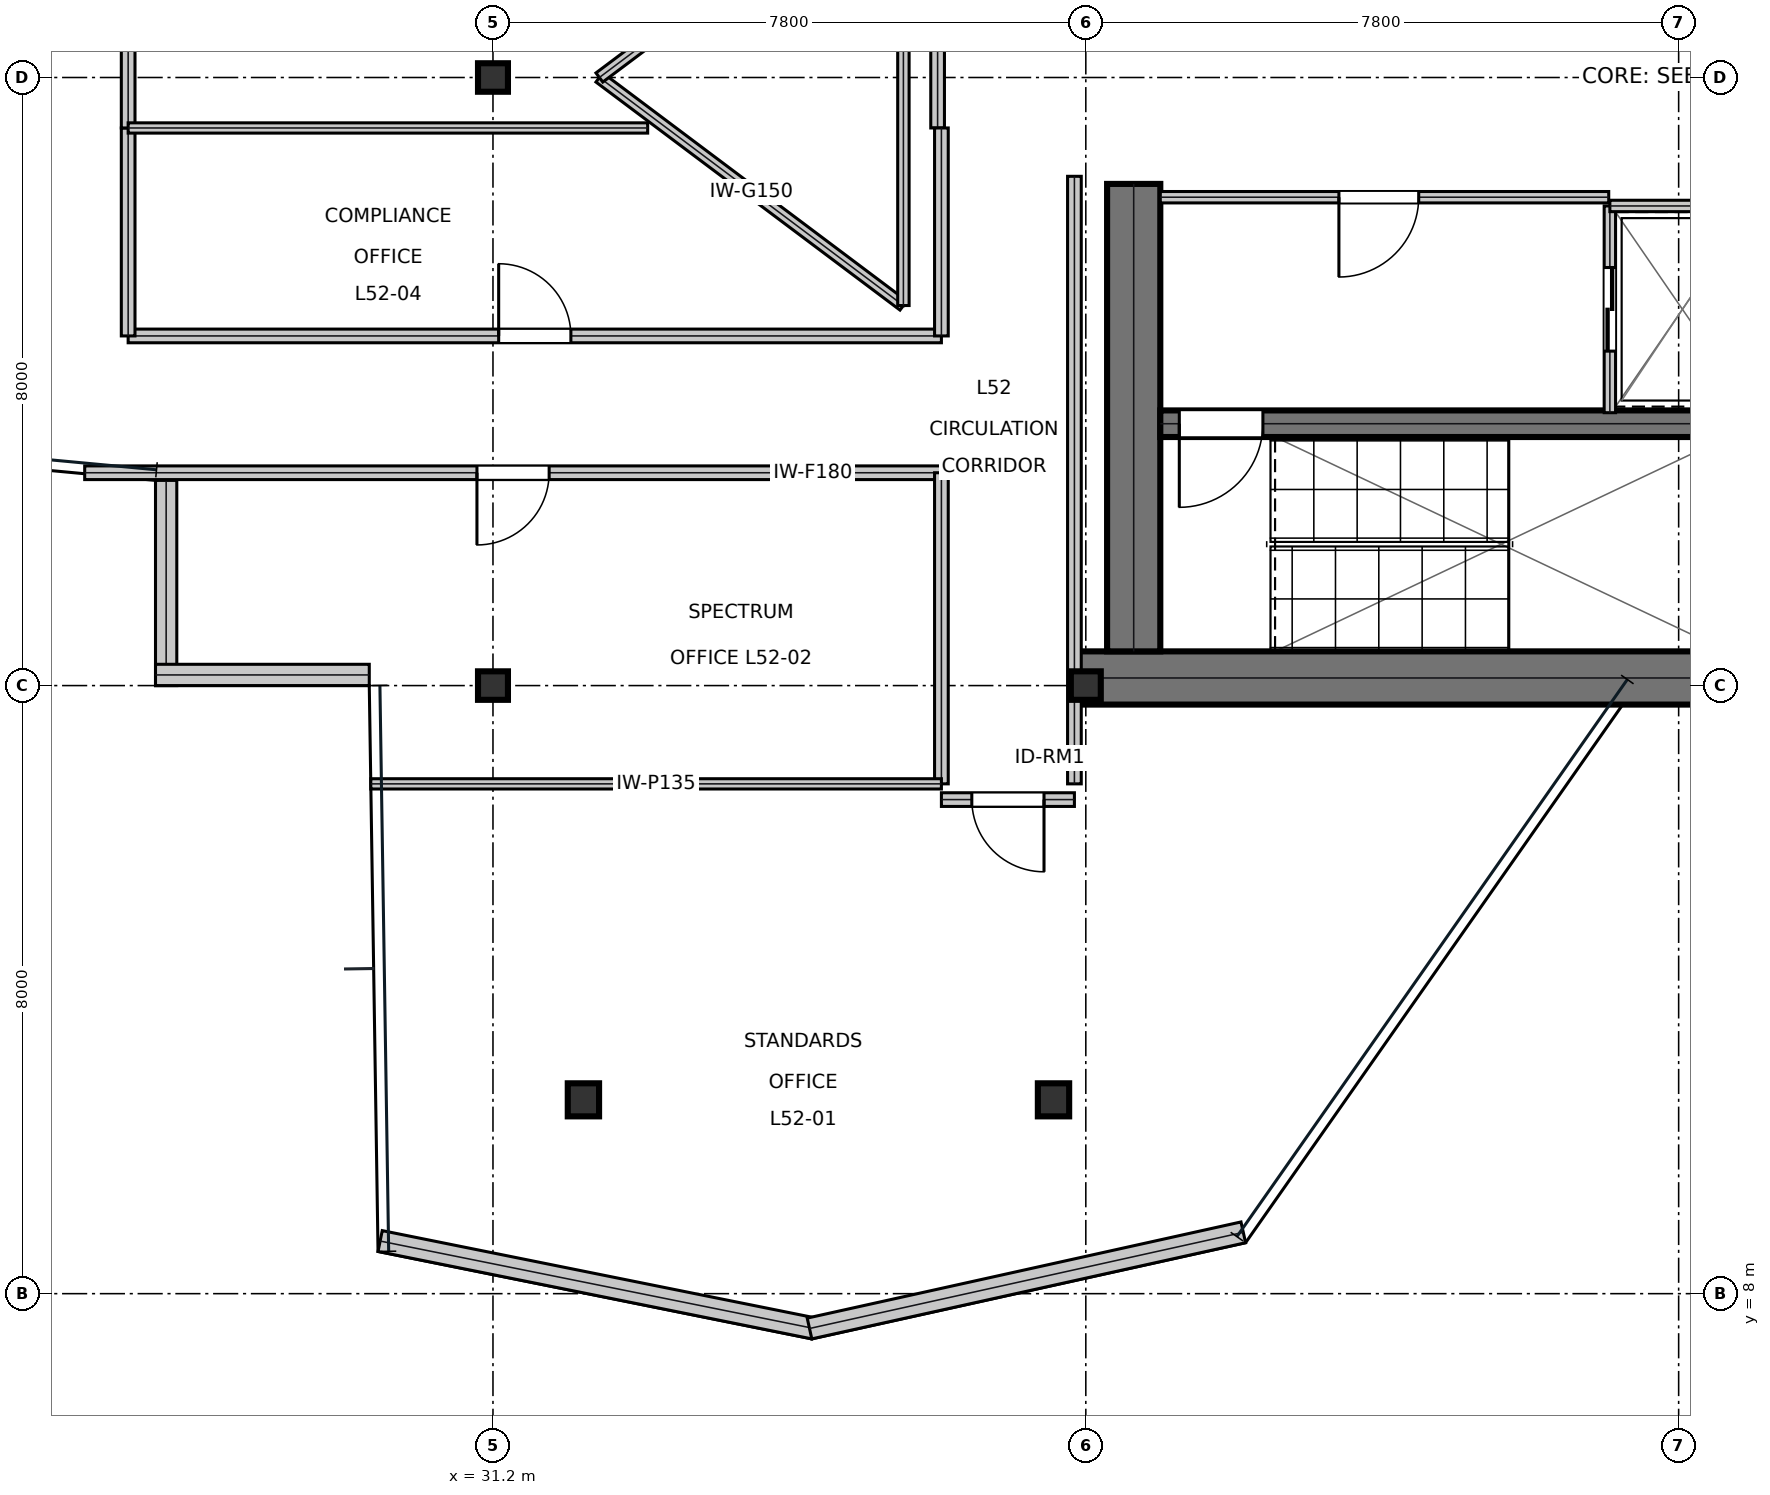
"""IFC4 building model, lengths in metres.
Left out: names, types, materials, properties, quantities, classifications, styles, units other than length and angle.
Written with IfcOpenShell. Run it as: python <this file> out.ifc"""

import sys

from ifc_helpers import new_model, si_unit, direction, frame, frame_2d, origin, origin_2d, place, context, subcontext, project, spatial, rectangle, i_section, extrude, element, fill, save


model = new_model("IFC4")
c1 = context("Model", 3, precision=1e-05, world=origin(), true_north=direction((0.0, 1.0)))
c2 = subcontext(c1, "Body", "Model", "MODEL_VIEW")
j1 = project(units=[si_unit("LENGTHUNIT", "METRE"), si_unit("PLANEANGLEUNIT", "RADIAN")], contexts=[c1])
p1 = place(None, origin())
s1 = spatial("IfcSite", under=j1, at=p1, CompositionType="ELEMENT")
p2 = place(p1, origin())
s2 = spatial("IfcBuilding", under=s1, at=p2, CompositionType="ELEMENT")
p3 = place(p2, frame((0.0, 0.0, 224.25)))
s3 = spatial("IfcBuildingStorey", under=s2, at=p3, CompositionType="ELEMENT", Elevation=224.25)
p4 = place(p3, frame((38.8, 16.1, 0.0), z_axis=(0.0, 0.0, 1.0), x_axis=(1.0, 0.0, 0.0)))
e1 = element("IfcWall", 1, at=p4, inside=s3, PredefinedType="SHEAR", context=c2, shape_type="SweptSolid", body=[
    extrude(rectangle(XDim=16.0, YDim=0.7, at=frame_2d((8.0, 0.0))), origin(), (0.0, 0.0, 1.0), 3.79),
])
p5 = place(p3, frame((39.63, 16.45, 0.0), z_axis=(0.0, 0.0, 1.0), x_axis=(0.0, 1.0, 0.0)))
e2 = element("IfcWall", 2, at=p5, inside=s3, PredefinedType="SHEAR", context=c2, shape_type="SweptSolid", body=[
    extrude(rectangle(XDim=6.15, YDim=0.7, at=frame_2d((3.075, 0.0))), origin(), (0.0, 0.0, 1.0), 3.79),
])
p6 = place(p3, frame((39.98, 19.445, 0.0), z_axis=(0.0, 0.0, 1.0), x_axis=(1.0, 0.0, 0.0)))
e3 = element("IfcWall", 3, at=p6, inside=s3, PredefinedType="SHEAR", context=c2, shape_type="SweptSolid", body=[
    extrude(rectangle(XDim=7.71, YDim=0.35, at=frame_2d((3.855, 0.0))), origin(), (0.0, 0.0, 1.0), 3.79),
])
p7 = place(p6, frame((0.25, 0.0, 0.0)))
e4 = element("IfcOpeningElement", 4, at=p7, cuts=e3, PredefinedType="OPENING", context=c2, shape_type="SweptSolid", body=[
    extrude(rectangle(XDim=1.1, YDim=2.15, at=frame_2d((0.55, 1.075))), frame((0.0, 0.185, 0.0), z_axis=(0.0, -1.0, 0.0), x_axis=(1.0, 0.0, 0.0)), (0.0, 0.0, 1.0), 0.37),
])
for number, where, z_axis, x_axis in (
    (5, (31.2, 16.0, 0.0), (0.0, 0.0, 1.0), (1.0, 0.0, 0.0)),
    (6, (31.2, 24.0, 0.0), (0.0, 0.0, 1.0), (1.0, 0.0, 0.0)),
    (7, (39.0, 16.0, 0.0), (0.0, 0.0, 1.0), (1.0, 0.0, 0.0)),
):
    element("IfcColumn", number, at=place(p3, frame(where, z_axis=z_axis, x_axis=x_axis)), inside=s3, PredefinedType="COLUMN", context=c2, shape_type="SweptSolid", body=[
        extrude(i_section(OverallWidth=0.394, OverallDepth=0.375, WebThickness=0.017, FlangeThickness=0.028, at=origin_2d()), origin(), (0.0, 0.0, 1.0), 4.044),
    ])
p8 = place(p3, frame((32.39, 10.55, 0.016), z_axis=(0.013968236766, 0.029819148922, 0.999457706318), x_axis=(-0.905569653976, 0.424197597586, 0.0)))
e8 = element("IfcColumn", 8, at=p8, inside=s3, PredefinedType="COLUMN", context=c2, shape_type="SweptSolid", body=[
    extrude(i_section(OverallWidth=0.412, OverallDepth=0.435, WebThickness=0.036, FlangeThickness=0.058, at=origin_2d()), origin(), (0.0, 0.0, 1.0), 4.02),
])
p9 = place(p3, frame((38.575, 10.55, 0.016), z_axis=(-0.004980404192, 0.029821688517, 0.99954282673), x_axis=(-0.986339577116, -0.164724735893, 0.0)))
e9 = element("IfcColumn", 9, at=p9, inside=s3, PredefinedType="COLUMN", context=c2, shape_type="SweptSolid", body=[
    extrude(i_section(OverallWidth=0.412, OverallDepth=0.435, WebThickness=0.036, FlangeThickness=0.058, at=origin_2d()), origin(), (0.0, 0.0, 1.0), 4.02),
])
p10 = place(p3, frame((26.9, 18.7, 0.0), z_axis=(0.0, 0.0, 1.0), x_axis=(0.0, -1.0, 0.0)))
e10 = element("IfcWall", 10, at=p10, inside=s3, PredefinedType="STANDARD", context=c2, shape_type="SweptSolid", body=[
    extrude(rectangle(XDim=2.7, YDim=0.28, at=frame_2d((1.35, 0.0))), origin(), (0.0, 0.0, 1.0), 3.319),
])
p11 = place(p3, frame((26.76, 16.14, 0.0), z_axis=(0.0, 0.0, 1.0), x_axis=(1.0, 0.0, 0.0)))
e11 = element("IfcWall", 11, at=p11, inside=s3, PredefinedType="STANDARD", context=c2, shape_type="SweptSolid", body=[
    extrude(rectangle(XDim=2.812, YDim=0.28, at=frame_2d((1.406, 0.0))), origin(), (0.0, 0.0, 1.0), 3.79),
])
p12 = place(p3, frame((29.715, 8.692, 0.0), z_axis=(0.0, 0.0, 1.0), x_axis=(0.98030065813, -0.197511062146, 0.0)))
e12 = element("IfcWall", 12, at=p12, inside=s3, PredefinedType="STANDARD", context=c2, shape_type="SweptSolid", body=[
    extrude(rectangle(XDim=5.822, YDim=0.28, at=frame_2d((2.911, 0.0))), origin(), (0.0, 0.0, 1.0), 3.79),
])
p13 = place(p3, frame((35.365, 7.542, 0.0), z_axis=(0.0, 0.0, 1.0), x_axis=(0.976309738065, 0.216377668346, 0.0)))
e13 = element("IfcWall", 13, at=p13, inside=s3, PredefinedType="STANDARD", context=c2, shape_type="SweptSolid", body=[
    extrude(rectangle(XDim=5.846, YDim=0.28, at=frame_2d((2.923, 0.0))), origin(), (0.0, 0.0, 1.0), 3.79),
])
p14 = place(p3, frame((39.98, 22.425, 0.0), z_axis=(0.0, 0.0, 1.0), x_axis=(1.0, 0.0, 0.0)))
e14 = element("IfcWall", 14, at=p14, inside=s3, PredefinedType="PARTITIONING", context=c2, shape_type="SweptSolid", body=[
    extrude(rectangle(XDim=5.9, YDim=0.15, at=frame_2d((2.95, 0.0))), origin(), (0.0, 0.0, 1.0), 3.79),
])
p15 = place(p14, frame((2.35, 0.0, 0.0)))
e15 = element("IfcOpeningElement", 15, at=p15, cuts=e14, PredefinedType="OPENING", context=c2, shape_type="SweptSolid", body=[
    extrude(rectangle(XDim=1.05, YDim=2.15, at=frame_2d((0.525, 1.075))), frame((0.0, 0.085, 0.0), z_axis=(0.0, -1.0, 0.0), x_axis=(1.0, 0.0, 0.0)), (0.0, 0.0, 1.0), 0.17),
])
p16 = place(p3, frame((45.895, 19.59, 0.0), z_axis=(0.0, 0.0, 1.0), x_axis=(0.0, 1.0, 0.0)))
e16 = element("IfcWall", 16, at=p16, inside=s3, PredefinedType="PARTITIONING", context=c2, shape_type="SweptSolid", body=[
    extrude(rectangle(XDim=2.72, YDim=0.15, at=frame_2d((1.36, 0.0))), origin(), (0.0, 0.0, 1.0), 3.79),
])
p17 = place(p16, frame((0.81, 0.0, 0.0)))
e17 = element("IfcOpeningElement", 17, at=p17, cuts=e16, PredefinedType="OPENING", context=c2, shape_type="SweptSolid", body=[
    extrude(rectangle(XDim=1.1, YDim=2.15, at=frame_2d((0.55, 1.075))), frame((0.0, 0.085, 0.0), z_axis=(0.0, -1.0, 0.0), x_axis=(1.0, 0.0, 0.0)), (0.0, 0.0, 1.0), 0.17),
])
p18 = place(p3, frame((45.895, 22.31, 0.0), z_axis=(0.0, 0.0, 1.0), x_axis=(1.0, 0.0, 0.0)))
e18 = element("IfcWall", 18, at=p18, inside=s3, PredefinedType="PARTITIONING", context=c2, shape_type="SweptSolid", body=[
    extrude(rectangle(XDim=1.915, YDim=0.15, at=frame_2d((0.958, 0.0))), origin(), (0.0, 0.0, 1.0), 3.79),
])
p19 = place(p3, frame((37.1, 14.5, 0.0), z_axis=(0.0, 0.0, 1.0), x_axis=(1.0, 0.0, 0.0)))
e19 = element("IfcWall", 19, at=p19, inside=s3, PredefinedType="SOLIDWALL", context=c2, shape_type="SweptSolid", body=[
    extrude(rectangle(XDim=1.75, YDim=0.18, at=frame_2d((0.875, 0.0))), origin(), (0.0, 0.0, 1.0), 3.241),
])
p20 = place(p19, frame((0.4, 0.0, 0.0)))
e20 = element("IfcOpeningElement", 20, at=p20, cuts=e19, PredefinedType="OPENING", context=c2, shape_type="SweptSolid", body=[
    extrude(rectangle(XDim=0.95, YDim=2.15, at=frame_2d((0.475, 1.075))), frame((0.0, 0.1, 0.0), z_axis=(0.0, -1.0, 0.0), x_axis=(1.0, 0.0, 0.0)), (0.0, 0.0, 1.0), 0.2),
])
p21 = place(p3, frame((25.828, 18.8, 0.0), z_axis=(0.0, 0.0, 1.0), x_axis=(1.0, 0.0, 0.0)))
e21 = element("IfcWall", 21, at=p21, inside=s3, PredefinedType="SOLIDWALL", context=c2, shape_type="SweptSolid", body=[
    extrude(rectangle(XDim=11.272, YDim=0.18, at=frame_2d((5.636, 0.0))), origin(), (0.0, 0.0, 1.0), 3.241),
])
p22 = place(p21, frame((5.161, 0.0, 0.0)))
e22 = element("IfcOpeningElement", 22, at=p22, cuts=e21, PredefinedType="OPENING", context=c2, shape_type="SweptSolid", body=[
    extrude(rectangle(XDim=0.95, YDim=2.15, at=frame_2d((0.475, 1.075))), frame((0.0, 0.1, 0.0), z_axis=(0.0, -1.0, 0.0), x_axis=(1.0, 0.0, 0.0)), (0.0, 0.0, 1.0), 0.2),
])
p23 = place(p3, frame((26.4, 20.6, 0.0), z_axis=(0.0, 0.0, 1.0), x_axis=(1.0, 0.0, 0.0)))
e23 = element("IfcWall", 23, at=p23, inside=s3, PredefinedType="SOLIDWALL", context=c2, shape_type="SweptSolid", body=[
    extrude(rectangle(XDim=10.7, YDim=0.18, at=frame_2d((5.35, 0.0))), origin(), (0.0, 0.0, 1.0), 3.241),
])
p24 = place(p23, frame((4.875, 0.0, 0.0)))
e24 = element("IfcOpeningElement", 24, at=p24, cuts=e23, PredefinedType="OPENING", context=c2, shape_type="SweptSolid", body=[
    extrude(rectangle(XDim=0.95, YDim=2.15, at=frame_2d((0.475, 1.075))), frame((0.0, 0.1, 0.0), z_axis=(0.0, -1.0, 0.0), x_axis=(1.0, 0.0, 0.0)), (0.0, 0.0, 1.0), 0.2),
])
p25 = place(p3, frame((37.05, 23.336, 0.0), z_axis=(0.0, 0.0, 1.0), x_axis=(0.0, 1.0, 0.0)))
e25 = element("IfcWall", 25, at=p25, inside=s3, PredefinedType="SOLIDWALL", context=c2, shape_type="SweptSolid", body=[
    extrude(rectangle(XDim=10.164, YDim=0.18, at=frame_2d((5.082, 0.0))), origin(), (0.0, 0.0, 1.0), 3.241),
])
p26 = place(p25, frame((4.607, 0.0, 0.0)))
e26 = element("IfcOpeningElement", 26, at=p26, cuts=e25, PredefinedType="OPENING", context=c2, shape_type="SweptSolid", body=[
    extrude(rectangle(XDim=0.95, YDim=2.15, at=frame_2d((0.475, 1.075))), frame((0.0, 0.1, 0.0), z_axis=(0.0, -1.0, 0.0), x_axis=(1.0, 0.0, 0.0)), (0.0, 0.0, 1.0), 0.2),
])
p27 = place(p3, frame((38.85, 14.707, 0.0), z_axis=(0.0, 0.0, 1.0), x_axis=(0.0, 1.0, 0.0)))
e27 = element("IfcWall", 27, at=p27, inside=s3, PredefinedType="SOLIDWALL", context=c2, shape_type="SweptSolid", body=[
    extrude(rectangle(XDim=7.993, YDim=0.18, at=frame_2d((3.997, 0.0))), origin(), (0.0, 0.0, 1.0), 3.241),
])
p28 = place(p3, frame((37.1, 14.707, 0.0), z_axis=(0.0, 0.0, 1.0), x_axis=(0.0, 1.0, 0.0)))
e28 = element("IfcWall", 28, at=p28, inside=s3, PredefinedType="SOLIDWALL", context=c2, shape_type="SweptSolid", body=[
    extrude(rectangle(XDim=4.093, YDim=0.18, at=frame_2d((2.046, 0.0))), origin(), (0.0, 0.0, 1.0), 3.241),
])
p29 = place(p3, frame((26.4, 20.6, 0.0), z_axis=(0.0, 0.0, 1.0), x_axis=(0.0, 1.0, 0.0)))
e29 = element("IfcWall", 29, at=p29, inside=s3, PredefinedType="SOLIDWALL", context=c2, shape_type="SweptSolid", body=[
    extrude(rectangle(XDim=2.736, YDim=0.18, at=frame_2d((1.368, 0.0))), origin(), (0.0, 0.0, 1.0), 3.241),
])
p30 = place(p3, frame((37.1, 20.6, 0.0), z_axis=(0.0, 0.0, 1.0), x_axis=(0.0, 1.0, 0.0)))
e30 = element("IfcWall", 30, at=p30, inside=s3, PredefinedType="SOLIDWALL", context=c2, shape_type="SweptSolid", body=[
    extrude(rectangle(XDim=2.736, YDim=0.18, at=frame_2d((1.368, 0.0))), origin(), (0.0, 0.0, 1.0), 3.79),
])
p31 = place(p3, frame((26.4, 23.336, 0.0), z_axis=(0.0, 0.0, 1.0), x_axis=(0.0, 1.0, 0.0)))
e31 = element("IfcWall", 31, at=p31, inside=s3, PredefinedType="SOLIDWALL", context=c2, shape_type="SweptSolid", body=[
    extrude(rectangle(XDim=5.931, YDim=0.18, at=frame_2d((2.965, 0.0))), origin(), (0.0, 0.0, 1.0), 3.241),
])
p32 = place(p3, frame((29.592, 14.707, 0.0), z_axis=(0.0, 0.0, 1.0), x_axis=(1.0, 0.0, 0.0)))
e32 = element("IfcWall", 32, at=p32, inside=s3, PredefinedType="PARTITIONING", context=c2, shape_type="SweptSolid", body=[
    extrude(rectangle(XDim=7.508, YDim=0.135, at=frame_2d((3.754, 0.0))), origin(), (0.0, 0.0, 1.0), 3.319),
])
p33 = place(p3, frame((26.4, 23.336, 0.0), z_axis=(0.0, 0.0, 1.0), x_axis=(1.0, 0.0, 0.0)))
e33 = element("IfcWall", 33, at=p33, inside=s3, PredefinedType="PARTITIONING", context=c2, shape_type="SweptSolid", body=[
    extrude(rectangle(XDim=6.835, YDim=0.135, at=frame_2d((3.418, 0.0))), origin(), (0.0, 0.0, 1.0), 3.241),
])
p34 = place(p3, frame((32.6, 24.0, 0.0), z_axis=(0.0, 0.0, 1.0), x_axis=(0.8, -0.6, 0.0)))
e34 = element("IfcWall", 34, at=p34, inside=s3, PredefinedType="MOVABLE", context=c2, shape_type="SweptSolid", body=[
    extrude(rectangle(XDim=5.0, YDim=0.15, at=frame_2d((2.5, 0.0))), origin(), (0.0, 0.0, 1.0), 3.79),
])
p35 = place(p3, frame((36.6, 21.0, 0.0), z_axis=(0.0, 0.0, 1.0), x_axis=(0.0, 1.0, 0.0)))
e35 = element("IfcWall", 35, at=p35, inside=s3, PredefinedType="MOVABLE", context=c2, shape_type="SweptSolid", body=[
    extrude(rectangle(XDim=6.0, YDim=0.15, at=frame_2d((3.0, 0.0))), origin(), (0.0, 0.0, 1.0), 3.79),
])
p36 = place(p3, frame((36.6, 27.0, 0.0), z_axis=(0.0, 0.0, 1.0), x_axis=(-0.8, -0.6, 0.0)))
e36 = element("IfcWall", 36, at=p36, inside=s3, PredefinedType="MOVABLE", context=c2, shape_type="SweptSolid", body=[
    extrude(rectangle(XDim=5.0, YDim=0.15, at=frame_2d((2.5, 0.0))), origin(), (0.0, 0.0, 1.0), 3.79),
])
p37 = place(p15, frame((1.05, 0.0, 0.0), z_axis=(0.0, 0.0, 1.0), x_axis=(-1.0, 0.0, 0.0)))
e37 = element("IfcDoor", 37, at=p37, inside=s3, OperationType="SINGLE_SWING_RIGHT", PredefinedType="DOOR", context=c2, shape_type="SweptSolid", body=[
    extrude(rectangle(XDim=1.05, YDim=2.15, at=frame_2d((0.525, 1.075))), frame((0.0, 0.025, 0.0), z_axis=(0.0, -1.0, 0.0), x_axis=(1.0, 0.0, 0.0)), (0.0, 0.0, 1.0), 0.05),
])
fill(e15, e37)
p38 = place(p17, frame((1.1, 0.0, 0.0), z_axis=(0.0, 0.0, 1.0), x_axis=(-1.0, 0.0, 0.0)))
e38 = element("IfcDoor", 38, at=p38, inside=s3, OperationType="DOUBLE_DOOR_SLIDING", PredefinedType="DOOR", context=c2, shape_type="SweptSolid", body=[
    extrude(rectangle(XDim=1.1, YDim=2.15, at=frame_2d((0.55, 1.075))), frame((0.0, 0.025, 0.0), z_axis=(0.0, -1.0, 0.0), x_axis=(1.0, 0.0, 0.0)), (0.0, 0.0, 1.0), 0.05),
])
fill(e17, e38)
p39 = place(p20, frame((0.95, 0.0, 0.0), z_axis=(0.0, 0.0, 1.0), x_axis=(-1.0, 0.0, 0.0)))
e39 = element("IfcDoor", 39, at=p39, inside=s3, OperationType="SINGLE_SWING_LEFT", PredefinedType="DOOR", context=c2, shape_type="SweptSolid", body=[
    extrude(rectangle(XDim=0.95, YDim=2.15, at=frame_2d((0.475, 1.075))), frame((0.0, 0.025, 0.0), z_axis=(0.0, -1.0, 0.0), x_axis=(1.0, 0.0, 0.0)), (0.0, 0.0, 1.0), 0.05),
])
fill(e20, e39)
p40 = place(p22, frame((0.95, 0.0, 0.0), z_axis=(0.0, 0.0, 1.0), x_axis=(-1.0, 0.0, 0.0)))
e40 = element("IfcDoor", 40, at=p40, inside=s3, OperationType="SINGLE_SWING_RIGHT", PredefinedType="DOOR", context=c2, shape_type="SweptSolid", body=[
    extrude(rectangle(XDim=0.95, YDim=2.15, at=frame_2d((0.475, 1.075))), frame((0.0, 0.025, 0.0), z_axis=(0.0, -1.0, 0.0), x_axis=(1.0, 0.0, 0.0)), (0.0, 0.0, 1.0), 0.05),
])
fill(e22, e40)
p41 = place(p24, origin())
e41 = element("IfcDoor", 41, at=p41, inside=s3, OperationType="SINGLE_SWING_LEFT", PredefinedType="DOOR", context=c2, shape_type="SweptSolid", body=[
    extrude(rectangle(XDim=0.95, YDim=2.15, at=frame_2d((0.475, 1.075))), frame((0.0, 0.025, 0.0), z_axis=(0.0, -1.0, 0.0), x_axis=(1.0, 0.0, 0.0)), (0.0, 0.0, 1.0), 0.05),
])
fill(e24, e41)
p42 = place(p7, frame((1.1, 0.0, 0.0), z_axis=(0.0, 0.0, 1.0), x_axis=(-1.0, 0.0, 0.0)))
e42 = element("IfcDoor", 42, at=p42, inside=s3, OperationType="SINGLE_SWING_RIGHT", PredefinedType="DOOR", context=c2, shape_type="SweptSolid", body=[
    extrude(rectangle(XDim=1.1, YDim=2.15, at=frame_2d((0.55, 1.075))), frame((0.0, 0.025, 0.0), z_axis=(0.0, -1.0, 0.0), x_axis=(1.0, 0.0, 0.0)), (0.0, 0.0, 1.0), 0.05),
])
fill(e4, e42)
save(model, sys.argv[1])
